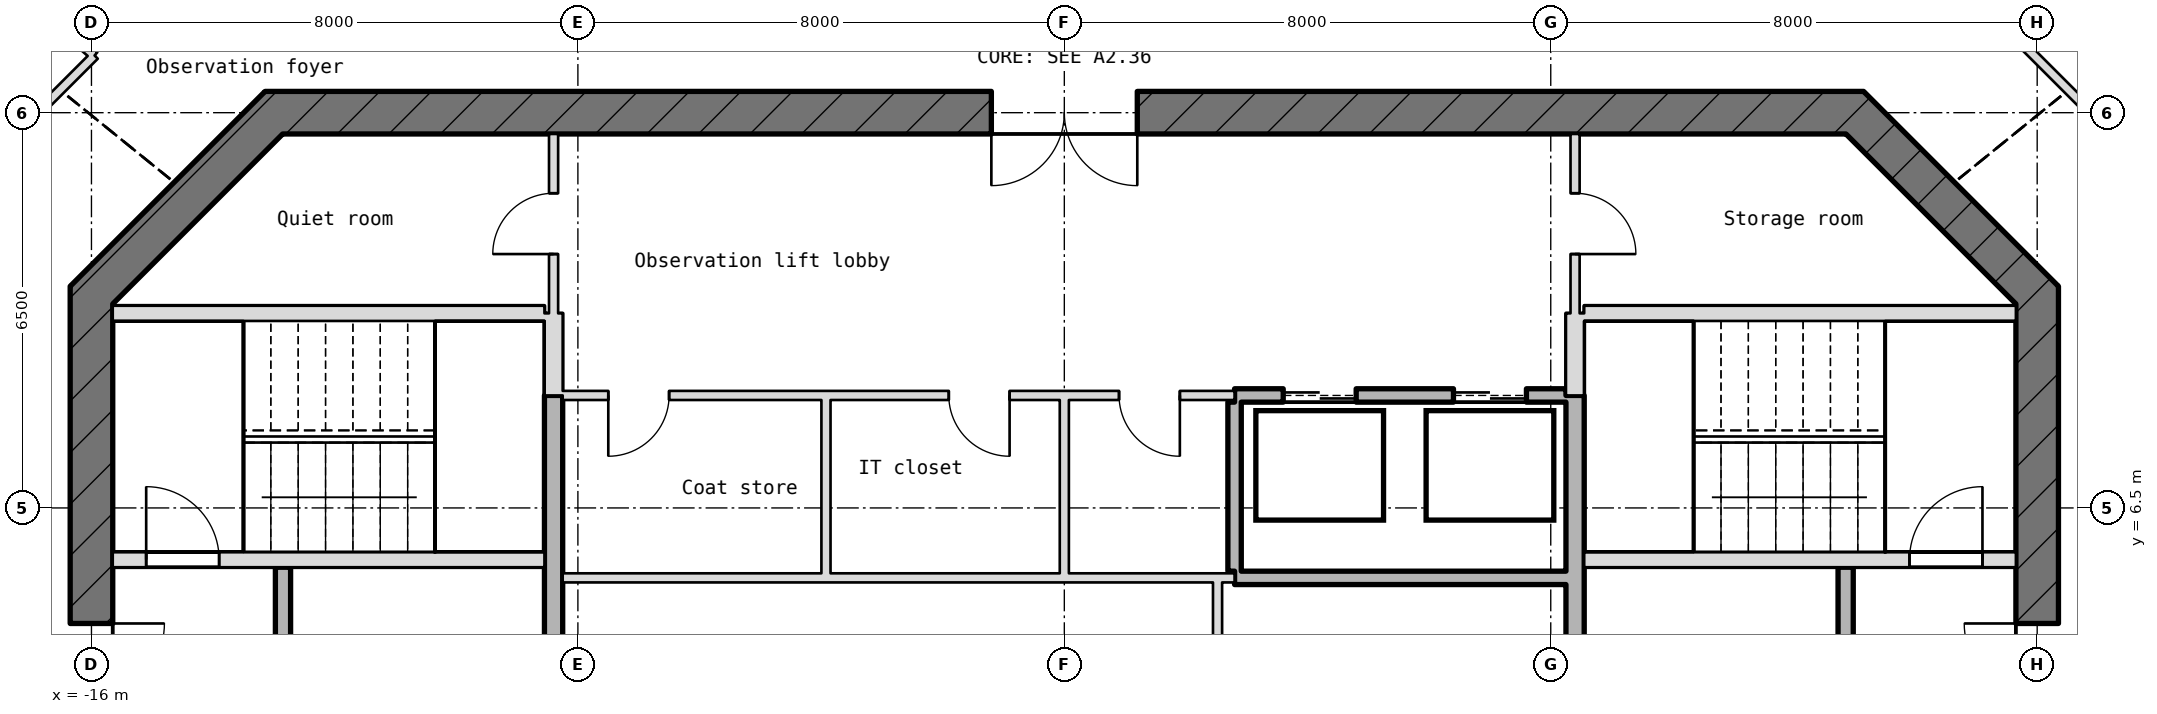
"""IFC4 building model, lengths in metres.
Left out: names, types, materials, properties, quantities, classifications, styles, units other than length and angle.
Written with IfcOpenShell. Run it as: python <this file> out.ifc"""

import sys

from ifc_helpers import new_model, si_unit, direction, frame, frame_2d, origin, place, context, subcontext, project, spatial, rectangle, extrude, element, fill, save


model = new_model("IFC4")
c1 = context("Model", 3, precision=1e-05, world=origin(), true_north=direction((0.0, 1.0)))
c2 = subcontext(c1, "Body", "Model", "MODEL_VIEW")
j1 = project(units=[si_unit("LENGTHUNIT", "METRE"), si_unit("PLANEANGLEUNIT", "RADIAN")], contexts=[c1])
p1 = place(None, origin())
s1 = spatial("IfcSite", under=j1, at=p1, CompositionType="ELEMENT")
p2 = place(p1, origin())
s2 = spatial("IfcBuilding", under=s1, at=p2, CompositionType="ELEMENT")
p3 = place(p2, frame((0.0, 0.0, 396.55)))
s3 = spatial("IfcBuildingStorey", under=s2, at=p3, CompositionType="ELEMENT", Elevation=396.55)
p4 = place(p3, frame((16.0, -10.145, -0.25), z_axis=(0.0, 0.0, 1.0), x_axis=(0.0, 1.0, 0.0)))
e1 = element("IfcWall", 1, at=p4, inside=s3, PredefinedType="SHEAR", context=c2, shape_type="SweptSolid", body=[
    extrude(rectangle(XDim=20.29, YDim=0.7, at=frame_2d((10.145, 0.0))), origin(), (0.0, 0.0, 1.0), 5.4),
])
p5 = place(p4, frame((8.945, 0.0, 0.25)))
e2 = element("IfcOpeningElement", 2, at=p5, cuts=e1, PredefinedType="OPENING", context=c2, shape_type="SweptSolid", body=[
    extrude(rectangle(XDim=2.4, YDim=2.1, at=frame_2d((1.2, 1.05))), frame((0.0, 0.36, 0.0), z_axis=(0.0, -1.0, 0.0), x_axis=(1.0, 0.0, 0.0)), (0.0, 0.0, 1.0), 0.72),
])
p6 = place(p4, frame((13.545, 0.0, 0.25)))
e3 = element("IfcOpeningElement", 3, at=p6, cuts=e1, PredefinedType="OPENING", context=c2, shape_type="SweptSolid", body=[
    extrude(rectangle(XDim=1.2, YDim=2.1, at=frame_2d((0.6, 1.05))), frame((0.0, 0.36, 0.0), z_axis=(0.0, -1.0, 0.0), x_axis=(1.0, 0.0, 0.0)), (0.0, 0.0, 1.0), 0.72),
])
p7 = place(p4, frame((3.545, 0.0, 0.25)))
e4 = element("IfcOpeningElement", 4, at=p7, cuts=e1, PredefinedType="OPENING", context=c2, shape_type="SweptSolid", body=[
    extrude(rectangle(XDim=1.2, YDim=2.1, at=frame_2d((0.6, 1.05))), frame((0.0, 0.36, 0.0), z_axis=(0.0, -1.0, 0.0), x_axis=(1.0, 0.0, 0.0)), (0.0, 0.0, 1.0), 0.72),
])
p8 = place(p3, frame((16.103, 9.897, -0.25), z_axis=(0.0, 0.0, 1.0), x_axis=(-0.707106781187, 0.707106781187, 0.0)))
e5 = element("IfcWall", 5, at=p8, inside=s3, PredefinedType="SHEAR", context=c2, shape_type="SweptSolid", body=[
    extrude(rectangle(XDim=4.533, YDim=0.7, at=frame_2d((2.266, 0.0))), origin(), (0.0, 0.0, 1.0), 5.4),
])
p9 = place(p3, frame((13.145, 13.0, -0.25), z_axis=(0.0, 0.0, 1.0), x_axis=(-1.0, 0.0, 0.0)))
e6 = element("IfcWall", 6, at=p9, inside=s3, PredefinedType="SHEAR", context=c2, shape_type="SweptSolid", body=[
    extrude(rectangle(XDim=26.29, YDim=0.7, at=frame_2d((13.145, 0.0))), origin(), (0.0, 0.0, 1.0), 5.4),
])
p10 = place(p9, frame((11.945, 0.0, 0.25)))
e7 = element("IfcOpeningElement", 7, at=p10, cuts=e6, PredefinedType="OPENING", context=c2, shape_type="SweptSolid", body=[
    extrude(rectangle(XDim=2.4, YDim=2.1, at=frame_2d((1.2, 1.05))), frame((0.0, 0.36, 0.0), z_axis=(0.0, -1.0, 0.0), x_axis=(1.0, 0.0, 0.0)), (0.0, 0.0, 1.0), 0.72),
])
p11 = place(p3, frame((-12.897, 13.103, -0.25), z_axis=(0.0, 0.0, 1.0), x_axis=(-0.707106781187, -0.707106781187, 0.0)))
e8 = element("IfcWall", 8, at=p11, inside=s3, PredefinedType="SHEAR", context=c2, shape_type="SweptSolid", body=[
    extrude(rectangle(XDim=4.533, YDim=0.7, at=frame_2d((2.266, 0.0))), origin(), (0.0, 0.0, 1.0), 5.4),
])
p12 = place(p3, frame((-16.0, 10.145, -0.25), z_axis=(0.0, 0.0, 1.0), x_axis=(0.0, -1.0, 0.0)))
e9 = element("IfcWall", 9, at=p12, inside=s3, PredefinedType="SHEAR", context=c2, shape_type="SweptSolid", body=[
    extrude(rectangle(XDim=20.29, YDim=0.7, at=frame_2d((10.145, 0.0))), origin(), (0.0, 0.0, 1.0), 5.4),
])
p13 = place(p12, frame((8.945, 0.0, 0.25)))
e10 = element("IfcOpeningElement", 10, at=p13, cuts=e9, PredefinedType="OPENING", context=c2, shape_type="SweptSolid", body=[
    extrude(rectangle(XDim=2.4, YDim=2.1, at=frame_2d((1.2, 1.05))), frame((0.0, 0.36, 0.0), z_axis=(0.0, -1.0, 0.0), x_axis=(1.0, 0.0, 0.0)), (0.0, 0.0, 1.0), 0.72),
])
p14 = place(p12, frame((5.545, 0.0, 0.25)))
e11 = element("IfcOpeningElement", 11, at=p14, cuts=e9, PredefinedType="OPENING", context=c2, shape_type="SweptSolid", body=[
    extrude(rectangle(XDim=1.2, YDim=2.1, at=frame_2d((0.6, 1.05))), frame((0.0, 0.36, 0.0), z_axis=(0.0, -1.0, 0.0), x_axis=(1.0, 0.0, 0.0)), (0.0, 0.0, 1.0), 0.72),
])
p15 = place(p3, frame((-8.25, 5.35, 0.0), z_axis=(0.0, 0.0, 1.0), x_axis=(1.0, 0.0, 0.0)))
e12 = element("IfcWall", 12, at=p15, inside=s3, PredefinedType="PARTITIONING", context=c2, shape_type="SweptSolid", body=[
    extrude(rectangle(XDim=11.05, YDim=0.15, at=frame_2d((5.525, 0.0))), origin(), (0.0, 0.0, 1.0), 5.15),
])
p16 = place(p3, frame((2.8, 5.35, 0.0), z_axis=(0.0, 0.0, 1.0), x_axis=(1.0, 0.0, 0.0)))
e13 = element("IfcWall", 13, at=p16, inside=s3, PredefinedType="STANDARD", context=c2, shape_type="SweptSolid", body=[
    extrude(rectangle(XDim=5.45, YDim=0.22, at=frame_2d((2.725, 0.0))), origin(), (0.0, 0.0, 1.0), 5.15),
])
p17 = place(p3, frame((-15.65, 5.65, -0.25), z_axis=(0.0, 0.0, 1.0), x_axis=(1.0, 0.0, 0.0)))
e14 = element("IfcWall", 14, at=p17, inside=s3, PredefinedType="SHEAR", context=c2, shape_type="SweptSolid", body=[
    extrude(rectangle(XDim=7.1, YDim=0.25, at=frame_2d((3.55, 0.0))), origin(), (0.0, 0.0, 1.0), 5.4),
])
p18 = place(p17, frame((0.55, 0.0, 0.25)))
e15 = element("IfcOpeningElement", 15, at=p18, cuts=e14, PredefinedType="OPENING", context=c2, shape_type="SweptSolid", body=[
    extrude(rectangle(XDim=1.2, YDim=2.1, at=frame_2d((0.6, 1.05))), frame((0.0, 0.135, 0.0), z_axis=(0.0, -1.0, 0.0), x_axis=(1.0, 0.0, 0.0)), (0.0, 0.0, 1.0), 0.27),
])
p19 = place(p3, frame((8.55, 5.65, -0.25), z_axis=(0.0, 0.0, 1.0), x_axis=(1.0, 0.0, 0.0)))
e16 = element("IfcWall", 16, at=p19, inside=s3, PredefinedType="SHEAR", context=c2, shape_type="SweptSolid", body=[
    extrude(rectangle(XDim=7.1, YDim=0.25, at=frame_2d((3.55, 0.0))), origin(), (0.0, 0.0, 1.0), 5.4),
])
p20 = place(p19, frame((5.35, 0.0, 0.25)))
e17 = element("IfcOpeningElement", 17, at=p20, cuts=e16, PredefinedType="OPENING", context=c2, shape_type="SweptSolid", body=[
    extrude(rectangle(XDim=1.2, YDim=2.1, at=frame_2d((0.6, 1.05))), frame((0.0, 0.135, 0.0), z_axis=(0.0, -1.0, 0.0), x_axis=(1.0, 0.0, 0.0)), (0.0, 0.0, 1.0), 0.27),
])
p21 = place(p3, frame((-8.25, 8.35, 0.0), z_axis=(0.0, 0.0, 1.0), x_axis=(1.0, 0.0, 0.0)))
e18 = element("IfcWall", 18, at=p21, inside=s3, PredefinedType="PARTITIONING", context=c2, shape_type="SweptSolid", body=[
    extrude(rectangle(XDim=11.05, YDim=0.15, at=frame_2d((5.525, 0.0))), origin(), (0.0, 0.0, 1.0), 5.15),
])
p22 = place(p21, frame((0.75, 0.0, 0.0)))
e19 = element("IfcOpeningElement", 19, at=p22, cuts=e18, PredefinedType="OPENING", context=c2, shape_type="SweptSolid", body=[
    extrude(rectangle(XDim=1.0, YDim=2.1, at=frame_2d((0.5, 1.05))), frame((0.0, 0.085, 0.0), z_axis=(0.0, -1.0, 0.0), x_axis=(1.0, 0.0, 0.0)), (0.0, 0.0, 1.0), 0.17),
])
p23 = place(p21, frame((6.35, 0.0, 0.0)))
e20 = element("IfcOpeningElement", 20, at=p23, cuts=e18, PredefinedType="OPENING", context=c2, shape_type="SweptSolid", body=[
    extrude(rectangle(XDim=1.0, YDim=2.1, at=frame_2d((0.5, 1.05))), frame((0.0, 0.085, 0.0), z_axis=(0.0, -1.0, 0.0), x_axis=(1.0, 0.0, 0.0)), (0.0, 0.0, 1.0), 0.17),
])
p24 = place(p21, frame((9.15, 0.0, 0.0)))
e21 = element("IfcOpeningElement", 21, at=p24, cuts=e18, PredefinedType="OPENING", context=c2, shape_type="SweptSolid", body=[
    extrude(rectangle(XDim=1.0, YDim=2.1, at=frame_2d((0.5, 1.05))), frame((0.0, 0.085, 0.0), z_axis=(0.0, -1.0, 0.0), x_axis=(1.0, 0.0, 0.0)), (0.0, 0.0, 1.0), 0.17),
])
p25 = place(p3, frame((2.8, 8.35, 0.0), z_axis=(0.0, 0.0, 1.0), x_axis=(1.0, 0.0, 0.0)))
e22 = element("IfcWall", 22, at=p25, inside=s3, PredefinedType="STANDARD", context=c2, shape_type="SweptSolid", body=[
    extrude(rectangle(XDim=5.45, YDim=0.22, at=frame_2d((2.725, 0.0))), origin(), (0.0, 0.0, 1.0), 5.15),
])
p26 = place(p25, frame((0.8, 0.0, 0.0)))
e23 = element("IfcOpeningElement", 23, at=p26, cuts=e22, PredefinedType="OPENING", context=c2, shape_type="SweptSolid", body=[
    extrude(rectangle(XDim=1.2, YDim=2.1, at=frame_2d((0.6, 1.05))), frame((0.0, 0.12, 0.0), z_axis=(0.0, -1.0, 0.0), x_axis=(1.0, 0.0, 0.0)), (0.0, 0.0, 1.0), 0.24),
])
p27 = place(p25, frame((3.6, 0.0, 0.0)))
e24 = element("IfcOpeningElement", 24, at=p27, cuts=e22, PredefinedType="OPENING", context=c2, shape_type="SweptSolid", body=[
    extrude(rectangle(XDim=1.2, YDim=2.1, at=frame_2d((0.6, 1.05))), frame((0.0, 0.12, 0.0), z_axis=(0.0, -1.0, 0.0), x_axis=(1.0, 0.0, 0.0)), (0.0, 0.0, 1.0), 0.24),
])
for number, where, z_axis, x_axis in (
    (25, (-15.65, 9.7, -0.25), (0.0, 0.0, 1.0), (1.0, 0.0, 0.0)),
    (26, (8.55, 9.7, -0.25), (0.0, 0.0, 1.0), (1.0, 0.0, 0.0)),
):
    element("IfcWall", number, at=place(p3, frame(where, z_axis=z_axis, x_axis=x_axis)), inside=s3, PredefinedType="SHEAR", context=c2, shape_type="SweptSolid", body=[
        extrude(rectangle(XDim=7.1, YDim=0.25, at=frame_2d((3.55, 0.0))), origin(), (0.0, 0.0, 1.0), 5.4),
    ])
p28 = place(p3, frame((-12.85, 2.475, 0.0), z_axis=(0.0, 0.0, 1.0), x_axis=(0.0, 1.0, 0.0)))
e27 = element("IfcWall", 27, at=p28, inside=s3, PredefinedType="STANDARD", context=c2, shape_type="SweptSolid", body=[
    extrude(rectangle(XDim=3.05, YDim=0.25, at=frame_2d((1.525, 0.0))), origin(), (0.0, 0.0, 1.0), 5.15),
])
p29 = place(p3, frame((-8.4, 2.5, -0.25), z_axis=(0.0, 0.0, 1.0), x_axis=(0.0, 1.0, 0.0)))
e28 = element("IfcWall", 28, at=p29, inside=s3, PredefinedType="SHEAR", context=c2, shape_type="SweptSolid", body=[
    extrude(rectangle(XDim=5.85, YDim=0.3, at=frame_2d((2.925, 0.0))), origin(), (0.0, 0.0, 1.0), 5.4),
])
p30 = place(p3, frame((-8.4, 8.35, -0.25), z_axis=(0.0, 0.0, 1.0), x_axis=(0.0, 1.0, 0.0)))
e29 = element("IfcWall", 29, at=p30, inside=s3, PredefinedType="SHEAR", context=c2, shape_type="SweptSolid", body=[
    extrude(rectangle(XDim=1.35, YDim=0.3, at=frame_2d((0.675, 0.0))), origin(), (0.0, 0.0, 1.0), 5.4),
])
p31 = place(p3, frame((-8.4, 9.7, 0.0), z_axis=(0.0, 0.0, 1.0), x_axis=(0.0, 1.0, 0.0)))
e30 = element("IfcWall", 30, at=p31, inside=s3, PredefinedType="PARTITIONING", context=c2, shape_type="SweptSolid", body=[
    extrude(rectangle(XDim=2.95, YDim=0.15, at=frame_2d((1.475, 0.0))), origin(), (0.0, 0.0, 1.0), 5.15),
])
p32 = place(p31, frame((0.975, 0.0, 0.0)))
e31 = element("IfcOpeningElement", 31, at=p32, cuts=e30, PredefinedType="OPENING", context=c2, shape_type="SweptSolid", body=[
    extrude(rectangle(XDim=1.0, YDim=2.1, at=frame_2d((0.5, 1.05))), frame((0.0, 0.085, 0.0), z_axis=(0.0, -1.0, 0.0), x_axis=(1.0, 0.0, 0.0)), (0.0, 0.0, 1.0), 0.17),
])
for number, where, z_axis, x_axis in (
    (32, (-3.92, 5.425, 0.0), (0.0, 0.0, 1.0), (0.0, 1.0, 0.0)),
    (33, (0.0, 5.425, 0.0), (0.0, 0.0, 1.0), (0.0, 1.0, 0.0)),
):
    element("IfcWall", number, at=place(p3, frame(where, z_axis=z_axis, x_axis=x_axis)), inside=s3, PredefinedType="PARTITIONING", context=c2, shape_type="SweptSolid", body=[
        extrude(rectangle(XDim=2.85, YDim=0.15, at=frame_2d((1.425, 0.0))), origin(), (0.0, 0.0, 1.0), 5.15),
    ])
p33 = place(p3, frame((2.52, 2.5, 0.0), z_axis=(0.0, 0.0, 1.0), x_axis=(0.0, 1.0, 0.0)))
e34 = element("IfcWall", 34, at=p33, inside=s3, PredefinedType="PARTITIONING", context=c2, shape_type="SweptSolid", body=[
    extrude(rectangle(XDim=2.775, YDim=0.15, at=frame_2d((1.387, 0.0))), origin(), (0.0, 0.0, 1.0), 5.15),
])
p34 = place(p3, frame((2.8, 5.46, 0.0), z_axis=(0.0, 0.0, 1.0), x_axis=(0.0, 1.0, 0.0)))
e35 = element("IfcWall", 35, at=p34, inside=s3, PredefinedType="STANDARD", context=c2, shape_type="SweptSolid", body=[
    extrude(rectangle(XDim=2.78, YDim=0.22, at=frame_2d((1.39, 0.0))), origin(), (0.0, 0.0, 1.0), 5.15),
])
p35 = place(p3, frame((8.4, 2.5, -0.25), z_axis=(0.0, 0.0, 1.0), x_axis=(0.0, 1.0, 0.0)))
e36 = element("IfcWall", 36, at=p35, inside=s3, PredefinedType="SHEAR", context=c2, shape_type="SweptSolid", body=[
    extrude(rectangle(XDim=5.85, YDim=0.3, at=frame_2d((2.925, 0.0))), origin(), (0.0, 0.0, 1.0), 5.4),
])
p36 = place(p3, frame((8.4, 8.35, -0.25), z_axis=(0.0, 0.0, 1.0), x_axis=(0.0, 1.0, 0.0)))
e37 = element("IfcWall", 37, at=p36, inside=s3, PredefinedType="SHEAR", context=c2, shape_type="SweptSolid", body=[
    extrude(rectangle(XDim=1.35, YDim=0.3, at=frame_2d((0.675, 0.0))), origin(), (0.0, 0.0, 1.0), 5.4),
])
p37 = place(p3, frame((8.4, 9.7, 0.0), z_axis=(0.0, 0.0, 1.0), x_axis=(0.0, 1.0, 0.0)))
e38 = element("IfcWall", 38, at=p37, inside=s3, PredefinedType="PARTITIONING", context=c2, shape_type="SweptSolid", body=[
    extrude(rectangle(XDim=2.95, YDim=0.15, at=frame_2d((1.475, 0.0))), origin(), (0.0, 0.0, 1.0), 5.15),
])
p38 = place(p37, frame((0.975, 0.0, 0.0)))
e39 = element("IfcOpeningElement", 39, at=p38, cuts=e38, PredefinedType="OPENING", context=c2, shape_type="SweptSolid", body=[
    extrude(rectangle(XDim=1.0, YDim=2.1, at=frame_2d((0.5, 1.05))), frame((0.0, 0.085, 0.0), z_axis=(0.0, -1.0, 0.0), x_axis=(1.0, 0.0, 0.0)), (0.0, 0.0, 1.0), 0.17),
])
p39 = place(p3, frame((12.85, 2.475, 0.0), z_axis=(0.0, 0.0, 1.0), x_axis=(0.0, 1.0, 0.0)))
e40 = element("IfcWall", 40, at=p39, inside=s3, PredefinedType="STANDARD", context=c2, shape_type="SweptSolid", body=[
    extrude(rectangle(XDim=3.05, YDim=0.25, at=frame_2d((1.525, 0.0))), origin(), (0.0, 0.0, 1.0), 5.15),
])
p40 = place(p3, frame((-18.75, 11.139, 0.0), z_axis=(0.0, 0.0, 1.0), x_axis=(0.707106781187, 0.707106781187, 0.0)))
e41 = element("IfcWall", 41, at=p40, inside=s3, PredefinedType="PARTITIONING", context=c2, shape_type="SweptSolid", body=[
    extrude(rectangle(XDim=3.962, YDim=0.15, at=frame_2d((1.981, 0.0))), origin(), (0.0, 0.0, 1.0), 5.15),
])
p41 = place(p3, frame((17.937, 11.952, 0.0), z_axis=(0.0, 0.0, 1.0), x_axis=(-0.707106781187, 0.707106781187, 0.0)))
e42 = element("IfcWall", 42, at=p41, inside=s3, PredefinedType="PARTITIONING", context=c2, shape_type="SweptSolid", body=[
    extrude(rectangle(XDim=3.29, YDim=0.15, at=frame_2d((1.645, 0.0))), origin(), (0.0, 0.0, 1.0), 5.15),
])
p42 = place(p3, frame((-15.952, 13.937, 0.0), z_axis=(0.0, 0.0, 1.0), x_axis=(-0.753175860567, 0.657819217612, 0.0)))
e43 = element("IfcWall", 43, at=p42, inside=s3, PredefinedType="PARTITIONING", context=c2, shape_type="SweptSolid", body=[
    extrude(rectangle(XDim=1.034, YDim=0.15, at=frame_2d((0.517, 0.0))), origin(), (0.0, 0.0, 1.0), 4.84),
])
p43 = place(p26, origin())
e44 = element("IfcDoor", 44, at=p43, inside=s3, OperationType="DOUBLE_DOOR_SLIDING", PredefinedType="DOOR", context=c2, shape_type="SweptSolid", body=[
    extrude(rectangle(XDim=1.2, YDim=2.1, at=frame_2d((0.6, 1.05))), frame((0.0, 0.025, 0.0), z_axis=(0.0, -1.0, 0.0), x_axis=(1.0, 0.0, 0.0)), (0.0, 0.0, 1.0), 0.05),
])
fill(e23, e44)
p44 = place(p27, origin())
e45 = element("IfcDoor", 45, at=p44, inside=s3, OperationType="DOUBLE_DOOR_SLIDING", PredefinedType="DOOR", context=c2, shape_type="SweptSolid", body=[
    extrude(rectangle(XDim=1.2, YDim=2.1, at=frame_2d((0.6, 1.05))), frame((0.0, 0.025, 0.0), z_axis=(0.0, -1.0, 0.0), x_axis=(1.0, 0.0, 0.0)), (0.0, 0.0, 1.0), 0.05),
])
fill(e24, e45)
p45 = place(p18, origin())
e46 = element("IfcDoor", 46, at=p45, inside=s3, OperationType="SINGLE_SWING_RIGHT", PredefinedType="DOOR", context=c2, shape_type="SweptSolid", body=[
    extrude(rectangle(XDim=1.2, YDim=2.1, at=frame_2d((0.6, 1.05))), frame((0.0, 0.025, 0.0), z_axis=(0.0, -1.0, 0.0), x_axis=(1.0, 0.0, 0.0)), (0.0, 0.0, 1.0), 0.05),
])
fill(e15, e46)
p46 = place(p20, origin())
e47 = element("IfcDoor", 47, at=p46, inside=s3, OperationType="SINGLE_SWING_RIGHT", PredefinedType="DOOR", context=c2, shape_type="SweptSolid", body=[
    extrude(rectangle(XDim=1.2, YDim=2.1, at=frame_2d((0.6, 1.05))), frame((0.0, 0.025, 0.0), z_axis=(0.0, -1.0, 0.0), x_axis=(1.0, 0.0, 0.0)), (0.0, 0.0, 1.0), 0.05),
])
fill(e17, e47)
p47 = place(p14, origin())
e48 = element("IfcDoor", 48, at=p47, inside=s3, OperationType="SINGLE_SWING_RIGHT", PredefinedType="DOOR", context=c2, shape_type="SweptSolid", body=[
    extrude(rectangle(XDim=1.2, YDim=2.1, at=frame_2d((0.6, 1.05))), frame((0.0, 0.025, 0.0), z_axis=(0.0, -1.0, 0.0), x_axis=(1.0, 0.0, 0.0)), (0.0, 0.0, 1.0), 0.05),
])
fill(e11, e48)
p48 = place(p6, origin())
e49 = element("IfcDoor", 49, at=p48, inside=s3, OperationType="SINGLE_SWING_RIGHT", PredefinedType="DOOR", context=c2, shape_type="SweptSolid", body=[
    extrude(rectangle(XDim=1.2, YDim=2.1, at=frame_2d((0.6, 1.05))), frame((0.0, 0.025, 0.0), z_axis=(0.0, -1.0, 0.0), x_axis=(1.0, 0.0, 0.0)), (0.0, 0.0, 1.0), 0.05),
])
fill(e3, e49)
p49 = place(p10, origin())
e50 = element("IfcDoor", 50, at=p49, inside=s3, OperationType="DOUBLE_DOOR_SINGLE_SWING", PredefinedType="DOOR", context=c2, shape_type="SweptSolid", body=[
    extrude(rectangle(XDim=2.4, YDim=2.1, at=frame_2d((1.2, 1.05))), frame((0.0, 0.025, 0.0), z_axis=(0.0, -1.0, 0.0), x_axis=(1.0, 0.0, 0.0)), (0.0, 0.0, 1.0), 0.05),
])
fill(e7, e50)
p50 = place(p22, frame((1.0, 0.0, 0.0), z_axis=(0.0, 0.0, 1.0), x_axis=(-1.0, 0.0, 0.0)))
e51 = element("IfcDoor", 51, at=p50, inside=s3, OperationType="SINGLE_SWING_LEFT", PredefinedType="DOOR", context=c2, shape_type="SweptSolid", body=[
    extrude(rectangle(XDim=1.0, YDim=2.1, at=frame_2d((0.5, 1.05))), frame((0.0, 0.025, 0.0), z_axis=(0.0, -1.0, 0.0), x_axis=(1.0, 0.0, 0.0)), (0.0, 0.0, 1.0), 0.05),
])
fill(e19, e51)
p51 = place(p23, frame((1.0, 0.0, 0.0), z_axis=(0.0, 0.0, 1.0), x_axis=(-1.0, 0.0, 0.0)))
e52 = element("IfcDoor", 52, at=p51, inside=s3, OperationType="SINGLE_SWING_LEFT", PredefinedType="DOOR", context=c2, shape_type="SweptSolid", body=[
    extrude(rectangle(XDim=1.0, YDim=2.1, at=frame_2d((0.5, 1.05))), frame((0.0, 0.025, 0.0), z_axis=(0.0, -1.0, 0.0), x_axis=(1.0, 0.0, 0.0)), (0.0, 0.0, 1.0), 0.05),
])
fill(e20, e52)
p52 = place(p24, frame((1.0, 0.0, 0.0), z_axis=(0.0, 0.0, 1.0), x_axis=(-1.0, 0.0, 0.0)))
e53 = element("IfcDoor", 53, at=p52, inside=s3, OperationType="SINGLE_SWING_LEFT", PredefinedType="DOOR", context=c2, shape_type="SweptSolid", body=[
    extrude(rectangle(XDim=1.0, YDim=2.1, at=frame_2d((0.5, 1.05))), frame((0.0, 0.025, 0.0), z_axis=(0.0, -1.0, 0.0), x_axis=(1.0, 0.0, 0.0)), (0.0, 0.0, 1.0), 0.05),
])
fill(e21, e53)
p53 = place(p32, origin())
e54 = element("IfcDoor", 54, at=p53, inside=s3, OperationType="SINGLE_SWING_RIGHT", PredefinedType="DOOR", context=c2, shape_type="SweptSolid", body=[
    extrude(rectangle(XDim=1.0, YDim=2.1, at=frame_2d((0.5, 1.05))), frame((0.0, 0.025, 0.0), z_axis=(0.0, -1.0, 0.0), x_axis=(1.0, 0.0, 0.0)), (0.0, 0.0, 1.0), 0.05),
])
fill(e31, e54)
p54 = place(p38, frame((1.0, 0.0, 0.0), z_axis=(0.0, 0.0, 1.0), x_axis=(-1.0, 0.0, 0.0)))
e55 = element("IfcDoor", 55, at=p54, inside=s3, OperationType="SINGLE_SWING_LEFT", PredefinedType="DOOR", context=c2, shape_type="SweptSolid", body=[
    extrude(rectangle(XDim=1.0, YDim=2.1, at=frame_2d((0.5, 1.05))), frame((0.0, 0.025, 0.0), z_axis=(0.0, -1.0, 0.0), x_axis=(1.0, 0.0, 0.0)), (0.0, 0.0, 1.0), 0.05),
])
fill(e39, e55)
save(model, sys.argv[1])
